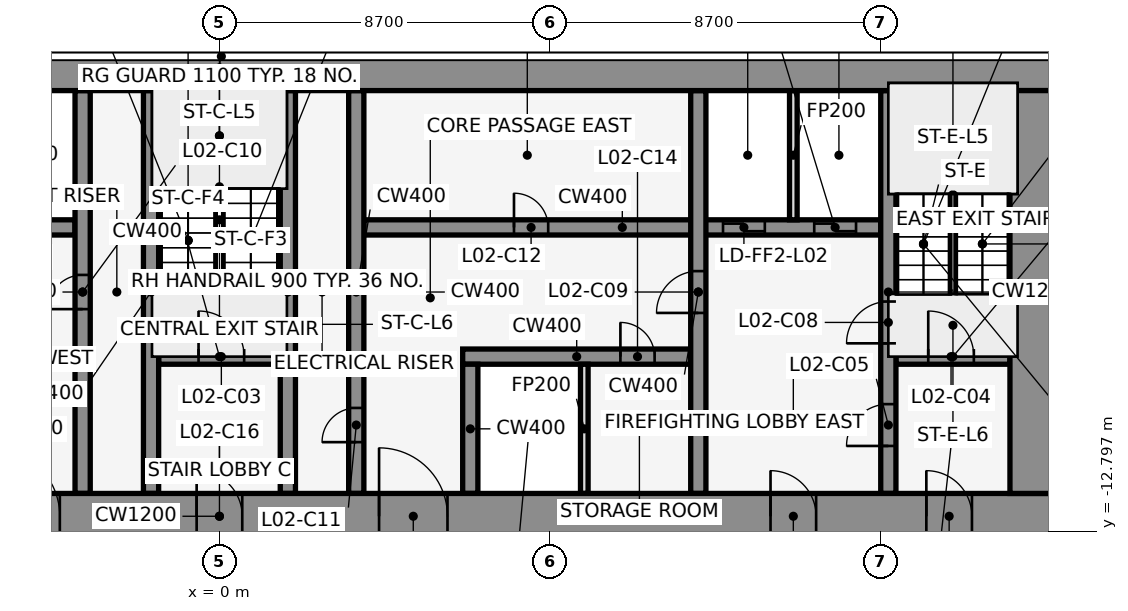
"""IFC4 building model, lengths in metres.
Left out: names, types, materials, properties, quantities, classifications, styles, units other than length and angle.
Written with IfcOpenShell. Run it as: python <this file> out.ifc"""

import sys

from ifc_helpers import new_model, si_unit, direction, frame, frame_2d, origin, place, context, subcontext, project, spatial, rectangle, extrude, element, fill, save


model = new_model("IFC4")
c1 = context("Model", 3, precision=1e-05, world=origin(), true_north=direction((0.0, 1.0)))
c2 = subcontext(c1, "Body", "Model", "MODEL_VIEW")
j1 = project(units=[si_unit("LENGTHUNIT", "METRE"), si_unit("PLANEANGLEUNIT", "RADIAN")], contexts=[c1])
p1 = place(None, origin())
s1 = spatial("IfcSite", under=j1, at=p1, CompositionType="ELEMENT")
p2 = place(p1, origin())
s2 = spatial("IfcBuilding", under=s1, at=p2, CompositionType="ELEMENT")
p3 = place(p2, frame((0.0, 0.0, 14.0)))
s3 = spatial("IfcBuildingStorey", under=s2, at=p3, CompositionType="ELEMENT", Elevation=14.0)
p4 = place(p3, frame((-1.6, -8.2, 0.0), z_axis=(0.0, 0.0, 1.0), x_axis=(1.0, 0.0, 0.0)))
e1 = element("IfcWall", 1, at=p4, inside=s3, PredefinedType="SHEAR", context=c2, shape_type="SweptSolid", body=[
    extrude(rectangle(XDim=3.2, YDim=0.4, at=frame_2d((1.6, 0.0))), origin(), (0.0, 0.0, 1.0), 6.0),
])
p5 = place(p4, frame((1.05, 0.0, 0.0)))
e2 = element("IfcOpeningElement", 2, at=p5, cuts=e1, PredefinedType="OPENING", context=c2, shape_type="SweptSolid", body=[
    extrude(rectangle(XDim=1.2, YDim=2.1, at=frame_2d((0.6, 1.05))), frame((0.0, 0.212, 0.0), z_axis=(0.0, -1.0, 0.0), x_axis=(1.0, 0.0, 0.0)), (0.0, 0.0, 1.0), 0.424),
])
p6 = place(p3, frame((6.4, -8.2, 0.0), z_axis=(0.0, 0.0, 1.0), x_axis=(1.0, 0.0, 0.0)))
e3 = element("IfcWall", 3, at=p6, inside=s3, PredefinedType="SHEAR", context=c2, shape_type="SweptSolid", body=[
    extrude(rectangle(XDim=6.0, YDim=0.4, at=frame_2d((3.0, 0.0))), origin(), (0.0, 0.0, 1.0), 6.0),
])
p7 = place(p6, frame((4.15, 0.0, 0.0)))
e4 = element("IfcOpeningElement", 4, at=p7, cuts=e3, PredefinedType="OPENING", context=c2, shape_type="SweptSolid", body=[
    extrude(rectangle(XDim=0.9, YDim=2.1, at=frame_2d((0.45, 1.05))), frame((0.0, 0.212, 0.0), z_axis=(0.0, -1.0, 0.0), x_axis=(1.0, 0.0, 0.0)), (0.0, 0.0, 1.0), 0.424),
])
p8 = place(p3, frame((17.8, -8.2, 0.0), z_axis=(0.0, 0.0, 1.0), x_axis=(1.0, 0.0, 0.0)))
e5 = element("IfcWall", 5, at=p8, inside=s3, PredefinedType="SHEAR", context=c2, shape_type="SweptSolid", body=[
    extrude(rectangle(XDim=3.0, YDim=0.4, at=frame_2d((1.5, 0.0))), origin(), (0.0, 0.0, 1.0), 6.0),
])
p9 = place(p8, frame((0.85, 0.0, 0.0)))
e6 = element("IfcOpeningElement", 6, at=p9, cuts=e5, PredefinedType="OPENING", context=c2, shape_type="SweptSolid", body=[
    extrude(rectangle(XDim=1.2, YDim=2.1, at=frame_2d((0.6, 1.05))), frame((0.0, 0.212, 0.0), z_axis=(0.0, -1.0, 0.0), x_axis=(1.0, 0.0, 0.0)), (0.0, 0.0, 1.0), 0.424),
])
p10 = place(p3, frame((-17.4, -4.8, 0.0), z_axis=(0.0, 0.0, 1.0), x_axis=(1.0, 0.0, 0.0)))
e7 = element("IfcWall", 7, at=p10, inside=s3, PredefinedType="SHEAR", context=c2, shape_type="SweptSolid", body=[
    extrude(rectangle(XDim=13.6, YDim=0.4, at=frame_2d((6.8, 0.0))), origin(), (0.0, 0.0, 1.0), 6.0),
])
p11 = place(p10, frame((0.65, 0.0, 0.0)))
e8 = element("IfcOpeningElement", 8, at=p11, cuts=e7, PredefinedType="OPENING", context=c2, shape_type="SweptSolid", body=[
    extrude(rectangle(XDim=1.1, YDim=2.1, at=frame_2d((0.55, 1.05))), frame((0.0, 0.212, 0.0), z_axis=(0.0, -1.0, 0.0), x_axis=(1.0, 0.0, 0.0)), (0.0, 0.0, 1.0), 0.424),
])
p12 = place(p10, frame((2.95, 0.0, 0.0)))
e9 = element("IfcOpeningElement", 9, at=p12, cuts=e7, PredefinedType="OPENING", context=c2, shape_type="SweptSolid", body=[
    extrude(rectangle(XDim=1.1, YDim=2.1, at=frame_2d((0.55, 1.05))), frame((0.0, 0.212, 0.0), z_axis=(0.0, -1.0, 0.0), x_axis=(1.0, 0.0, 0.0)), (0.0, 0.0, 1.0), 0.424),
])
p13 = place(p10, frame((5.65, 0.0, 0.0)))
e10 = element("IfcOpeningElement", 10, at=p13, cuts=e7, PredefinedType="OPENING", context=c2, shape_type="SweptSolid", body=[
    extrude(rectangle(XDim=1.2, YDim=2.1, at=frame_2d((0.6, 1.05))), frame((0.0, 0.212, 0.0), z_axis=(0.0, -1.0, 0.0), x_axis=(1.0, 0.0, 0.0)), (0.0, 0.0, 1.0), 0.424),
])
p14 = place(p10, frame((8.65, 0.0, 0.0)))
e11 = element("IfcOpeningElement", 11, at=p14, cuts=e7, PredefinedType="OPENING", context=c2, shape_type="SweptSolid", body=[
    extrude(rectangle(XDim=1.2, YDim=2.1, at=frame_2d((0.6, 1.05))), frame((0.0, 0.212, 0.0), z_axis=(0.0, -1.0, 0.0), x_axis=(1.0, 0.0, 0.0)), (0.0, 0.0, 1.0), 0.424),
])
p15 = place(p10, frame((11.65, 0.0, 0.0)))
e12 = element("IfcOpeningElement", 12, at=p15, cuts=e7, PredefinedType="OPENING", context=c2, shape_type="SweptSolid", body=[
    extrude(rectangle(XDim=1.2, YDim=2.1, at=frame_2d((0.6, 1.05))), frame((0.0, 0.212, 0.0), z_axis=(0.0, -1.0, 0.0), x_axis=(1.0, 0.0, 0.0)), (0.0, 0.0, 1.0), 0.424),
])
p16 = place(p3, frame((3.8, -4.8, 0.0), z_axis=(0.0, 0.0, 1.0), x_axis=(1.0, 0.0, 0.0)))
e13 = element("IfcWall", 13, at=p16, inside=s3, PredefinedType="SHEAR", context=c2, shape_type="SweptSolid", body=[
    extrude(rectangle(XDim=13.6, YDim=0.4, at=frame_2d((6.8, 0.0))), origin(), (0.0, 0.0, 1.0), 6.0),
])
p17 = place(p16, frame((9.45, 0.0, 0.0)))
e14 = element("IfcOpeningElement", 14, at=p17, cuts=e13, PredefinedType="OPENING", context=c2, shape_type="SweptSolid", body=[
    extrude(rectangle(XDim=1.1, YDim=2.1, at=frame_2d((0.55, 1.05))), frame((0.0, 0.212, 0.0), z_axis=(0.0, -1.0, 0.0), x_axis=(1.0, 0.0, 0.0)), (0.0, 0.0, 1.0), 0.424),
])
p18 = place(p16, frame((11.85, 0.0, 0.0)))
e15 = element("IfcOpeningElement", 15, at=p18, cuts=e13, PredefinedType="OPENING", context=c2, shape_type="SweptSolid", body=[
    extrude(rectangle(XDim=1.1, YDim=2.1, at=frame_2d((0.55, 1.05))), frame((0.0, 0.212, 0.0), z_axis=(0.0, -1.0, 0.0), x_axis=(1.0, 0.0, 0.0)), (0.0, 0.0, 1.0), 0.424),
])
p19 = place(p16, frame((3.95, 0.0, 0.0)))
e16 = element("IfcOpeningElement", 16, at=p19, cuts=e13, PredefinedType="OPENING", context=c2, shape_type="SweptSolid", body=[
    extrude(rectangle(XDim=0.9, YDim=2.1, at=frame_2d((0.45, 1.05))), frame((0.0, 0.212, 0.0), z_axis=(0.0, -1.0, 0.0), x_axis=(1.0, 0.0, 0.0)), (0.0, 0.0, 1.0), 0.424),
])
p20 = place(p3, frame((-3.6, -11.8, 0.0), z_axis=(0.0, 0.0, 1.0), x_axis=(0.0, 1.0, 0.0)))
e17 = element("IfcWall", 17, at=p20, inside=s3, PredefinedType="SHEAR", context=c2, shape_type="SweptSolid", body=[
    extrude(rectangle(XDim=10.6, YDim=0.4, at=frame_2d((5.3, 0.0))), origin(), (0.0, 0.0, 1.0), 6.0),
])
p21 = place(p20, frame((4.85, 0.0, 0.0)))
e18 = element("IfcOpeningElement", 18, at=p21, cuts=e17, PredefinedType="OPENING", context=c2, shape_type="SweptSolid", body=[
    extrude(rectangle(XDim=0.9, YDim=2.1, at=frame_2d((0.45, 1.05))), frame((0.0, 0.212, 0.0), z_axis=(0.0, -1.0, 0.0), x_axis=(1.0, 0.0, 0.0)), (0.0, 0.0, 1.0), 0.424),
])
for number, where, z_axis, x_axis in (
    (19, (-1.8, -11.8, 0.0), (0.0, 0.0, 1.0), (0.0, 1.0, 0.0)),
    (20, (1.8, -11.8, 0.0), (0.0, 0.0, 1.0), (0.0, 1.0, 0.0)),
):
    element("IfcWall", number, at=place(p3, frame(where, z_axis=z_axis, x_axis=x_axis)), inside=s3, PredefinedType="SHEAR", context=c2, shape_type="SweptSolid", body=[
        extrude(rectangle(XDim=10.6, YDim=0.4, at=frame_2d((5.3, 0.0))), origin(), (0.0, 0.0, 1.0), 6.0),
    ])
p22 = place(p3, frame((3.6, -11.8, 0.0), z_axis=(0.0, 0.0, 1.0), x_axis=(0.0, 1.0, 0.0)))
e21 = element("IfcWall", 21, at=p22, inside=s3, PredefinedType="SHEAR", context=c2, shape_type="SweptSolid", body=[
    extrude(rectangle(XDim=10.6, YDim=0.4, at=frame_2d((5.3, 0.0))), origin(), (0.0, 0.0, 1.0), 6.0),
])
p23 = place(p22, frame((1.35, 0.0, 0.0)))
e22 = element("IfcOpeningElement", 22, at=p23, cuts=e21, PredefinedType="OPENING", context=c2, shape_type="SweptSolid", body=[
    extrude(rectangle(XDim=0.9, YDim=2.1, at=frame_2d((0.45, 1.05))), frame((0.0, 0.212, 0.0), z_axis=(0.0, -1.0, 0.0), x_axis=(1.0, 0.0, 0.0)), (0.0, 0.0, 1.0), 0.424),
])
p24 = place(p3, frame((6.6, -11.8, 0.0), z_axis=(0.0, 0.0, 1.0), x_axis=(0.0, 1.0, 0.0)))
e23 = element("IfcWall", 23, at=p24, inside=s3, PredefinedType="SHEAR", context=c2, shape_type="SweptSolid", body=[
    extrude(rectangle(XDim=3.4, YDim=0.4, at=frame_2d((1.7, 0.0))), origin(), (0.0, 0.0, 1.0), 6.0),
])
p25 = place(p3, frame((9.6, -11.8, 0.0), z_axis=(0.0, 0.0, 1.0), x_axis=(0.0, 1.0, 0.0)))
e24 = element("IfcWall", 24, at=p25, inside=s3, PredefinedType="PARTITIONING", context=c2, shape_type="SweptSolid", body=[
    extrude(rectangle(XDim=3.4, YDim=0.2, at=frame_2d((1.7, 0.0))), origin(), (0.0, 0.0, 1.0), 5.7),
])
p26 = place(p3, frame((12.6, -11.8, 0.0), z_axis=(0.0, 0.0, 1.0), x_axis=(0.0, 1.0, 0.0)))
e25 = element("IfcWall", 25, at=p26, inside=s3, PredefinedType="SHEAR", context=c2, shape_type="SweptSolid", body=[
    extrude(rectangle(XDim=10.6, YDim=0.4, at=frame_2d((5.3, 0.0))), origin(), (0.0, 0.0, 1.0), 6.0),
])
p27 = place(p26, frame((4.75, 0.0, 0.0)))
e26 = element("IfcOpeningElement", 26, at=p27, cuts=e25, PredefinedType="OPENING", context=c2, shape_type="SweptSolid", body=[
    extrude(rectangle(XDim=1.1, YDim=2.1, at=frame_2d((0.55, 1.05))), frame((0.0, 0.212, 0.0), z_axis=(0.0, -1.0, 0.0), x_axis=(1.0, 0.0, 0.0)), (0.0, 0.0, 1.0), 0.424),
])
p28 = place(p3, frame((15.1, -4.6, 0.0), z_axis=(0.0, 0.0, 1.0), x_axis=(0.0, 1.0, 0.0)))
e27 = element("IfcWall", 27, at=p28, inside=s3, PredefinedType="PARTITIONING", context=c2, shape_type="SweptSolid", body=[
    extrude(rectangle(XDim=3.4, YDim=0.2, at=frame_2d((1.7, 0.0))), origin(), (0.0, 0.0, 1.0), 5.7),
])
p29 = place(p3, frame((17.6, -11.8, 0.0), z_axis=(0.0, 0.0, 1.0), x_axis=(0.0, 1.0, 0.0)))
e28 = element("IfcWall", 28, at=p29, inside=s3, PredefinedType="SHEAR", context=c2, shape_type="SweptSolid", body=[
    extrude(rectangle(XDim=10.6, YDim=0.4, at=frame_2d((5.3, 0.0))), origin(), (0.0, 0.0, 1.0), 6.0),
])
p30 = place(p29, frame((1.25, 0.0, 0.0)))
e29 = element("IfcOpeningElement", 29, at=p30, cuts=e28, PredefinedType="OPENING", context=c2, shape_type="SweptSolid", body=[
    extrude(rectangle(XDim=1.1, YDim=2.1, at=frame_2d((0.55, 1.05))), frame((0.0, 0.212, 0.0), z_axis=(0.0, -1.0, 0.0), x_axis=(1.0, 0.0, 0.0)), (0.0, 0.0, 1.0), 0.424),
])
p31 = place(p29, frame((3.95, 0.0, 0.0)))
e30 = element("IfcOpeningElement", 30, at=p31, cuts=e28, PredefinedType="OPENING", context=c2, shape_type="SweptSolid", body=[
    extrude(rectangle(XDim=1.1, YDim=2.1, at=frame_2d((0.55, 1.05))), frame((0.0, 0.212, 0.0), z_axis=(0.0, -1.0, 0.0), x_axis=(1.0, 0.0, 0.0)), (0.0, 0.0, 1.0), 0.424),
])
p32 = place(p3, frame((-22.0, -0.6, 0.0), z_axis=(0.0, 0.0, 1.0), x_axis=(1.0, 0.0, 0.0)))
e31 = element("IfcWall", 31, at=p32, inside=s3, PredefinedType="SHEAR", context=c2, shape_type="SweptSolid", body=[
    extrude(rectangle(XDim=44.0, YDim=1.2, at=frame_2d((22.0, 0.0))), origin(), (0.0, 0.0, 1.0), 6.0),
])
p33 = place(p3, frame((-22.0, -12.4, 0.0), z_axis=(0.0, 0.0, 1.0), x_axis=(1.0, 0.0, 0.0)))
e32 = element("IfcWall", 32, at=p33, inside=s3, PredefinedType="SHEAR", context=c2, shape_type="SweptSolid", body=[
    extrude(rectangle(XDim=44.0, YDim=1.2, at=frame_2d((22.0, 0.0))), origin(), (0.0, 0.0, 1.0), 6.0),
])
p34 = place(p33, frame((2.2, 0.0, 0.0)))
e33 = element("IfcOpeningElement", 33, at=p34, cuts=e32, PredefinedType="OPENING", context=c2, shape_type="SweptSolid", body=[
    extrude(rectangle(XDim=1.2, YDim=2.1, at=frame_2d((0.6, 1.05))), frame((0.0, 0.612, 0.0), z_axis=(0.0, -1.0, 0.0), x_axis=(1.0, 0.0, 0.0)), (0.0, 0.0, 1.0), 1.224),
])
p35 = place(p33, frame((21.4, 0.0, 0.0)))
e34 = element("IfcOpeningElement", 34, at=p35, cuts=e32, PredefinedType="OPENING", context=c2, shape_type="SweptSolid", body=[
    extrude(rectangle(XDim=1.2, YDim=2.1, at=frame_2d((0.6, 1.05))), frame((0.0, 0.612, 0.0), z_axis=(0.0, -1.0, 0.0), x_axis=(1.0, 0.0, 0.0)), (0.0, 0.0, 1.0), 1.224),
])
p36 = place(p33, frame((40.6, 0.0, 0.0)))
e35 = element("IfcOpeningElement", 35, at=p36, cuts=e32, PredefinedType="OPENING", context=c2, shape_type="SweptSolid", body=[
    extrude(rectangle(XDim=1.2, YDim=2.1, at=frame_2d((0.6, 1.05))), frame((0.0, 0.612, 0.0), z_axis=(0.0, -1.0, 0.0), x_axis=(1.0, 0.0, 0.0)), (0.0, 0.0, 1.0), 1.224),
])
p37 = place(p33, frame((16.0, 0.0, 0.0)))
e36 = element("IfcOpeningElement", 36, at=p37, cuts=e32, PredefinedType="OPENING", context=c2, shape_type="SweptSolid", body=[
    extrude(rectangle(XDim=1.8, YDim=2.1, at=frame_2d((0.9, 1.05))), frame((0.0, 0.612, 0.0), z_axis=(0.0, -1.0, 0.0), x_axis=(1.0, 0.0, 0.0)), (0.0, 0.0, 1.0), 1.224),
])
p38 = place(p33, frame((6.3, 0.0, 0.0)))
e37 = element("IfcOpeningElement", 37, at=p38, cuts=e32, PredefinedType="OPENING", context=c2, shape_type="SweptSolid", body=[
    extrude(rectangle(XDim=1.2, YDim=2.1, at=frame_2d((0.6, 1.05))), frame((0.0, 0.612, 0.0), z_axis=(0.0, -1.0, 0.0), x_axis=(1.0, 0.0, 0.0)), (0.0, 0.0, 1.0), 1.224),
])
p39 = place(p33, frame((26.2, 0.0, 0.0)))
e38 = element("IfcOpeningElement", 38, at=p39, cuts=e32, PredefinedType="OPENING", context=c2, shape_type="SweptSolid", body=[
    extrude(rectangle(XDim=1.8, YDim=2.1, at=frame_2d((0.9, 1.05))), frame((0.0, 0.612, 0.0), z_axis=(0.0, -1.0, 0.0), x_axis=(1.0, 0.0, 0.0)), (0.0, 0.0, 1.0), 1.224),
])
p40 = place(p33, frame((36.5, 0.0, 0.0)))
e39 = element("IfcOpeningElement", 39, at=p40, cuts=e32, PredefinedType="OPENING", context=c2, shape_type="SweptSolid", body=[
    extrude(rectangle(XDim=1.2, YDim=2.1, at=frame_2d((0.6, 1.05))), frame((0.0, 0.612, 0.0), z_axis=(0.0, -1.0, 0.0), x_axis=(1.0, 0.0, 0.0)), (0.0, 0.0, 1.0), 1.224),
])
p41 = place(p3, frame((21.4, -11.8, 0.0), z_axis=(0.0, 0.0, 1.0), x_axis=(0.0, 1.0, 0.0)))
e40 = element("IfcWall", 40, at=p41, inside=s3, PredefinedType="SHEAR", context=c2, shape_type="SweptSolid", body=[
    extrude(rectangle(XDim=10.6, YDim=1.2, at=frame_2d((5.3, 0.0))), origin(), (0.0, 0.0, 1.0), 6.0),
])
p42 = place(p5, origin())
e41 = element("IfcDoor", 41, at=p42, inside=s3, OperationType="SINGLE_SWING_LEFT", PredefinedType="DOOR", context=c2, shape_type="SweptSolid", body=[
    extrude(rectangle(XDim=1.2, YDim=2.1, at=frame_2d((0.6, 1.05))), frame((0.0, 0.025, 0.0), z_axis=(0.0, -1.0, 0.0), x_axis=(1.0, 0.0, 0.0)), (0.0, 0.0, 1.0), 0.05),
])
fill(e2, e41)
p43 = place(p9, origin())
e42 = element("IfcDoor", 42, at=p43, inside=s3, OperationType="SINGLE_SWING_RIGHT", PredefinedType="DOOR", context=c2, shape_type="SweptSolid", body=[
    extrude(rectangle(XDim=1.2, YDim=2.1, at=frame_2d((0.6, 1.05))), frame((0.0, 0.025, 0.0), z_axis=(0.0, -1.0, 0.0), x_axis=(1.0, 0.0, 0.0)), (0.0, 0.0, 1.0), 0.05),
])
fill(e6, e42)
p44 = place(p30, origin())
e43 = element("IfcDoor", 43, at=p44, inside=s3, OperationType="SINGLE_SWING_LEFT", PredefinedType="DOOR", context=c2, shape_type="SweptSolid", body=[
    extrude(rectangle(XDim=1.1, YDim=2.1, at=frame_2d((0.55, 1.05))), frame((0.0, 0.025, 0.0), z_axis=(0.0, -1.0, 0.0), x_axis=(1.0, 0.0, 0.0)), (0.0, 0.0, 1.0), 0.05),
])
fill(e29, e43)
p45 = place(p17, origin())
e44 = element("IfcDoor", 44, at=p45, inside=s3, OperationType="DOUBLE_DOOR_SLIDING", PredefinedType="DOOR", context=c2, shape_type="SweptSolid", body=[
    extrude(rectangle(XDim=1.1, YDim=2.1, at=frame_2d((0.55, 1.05))), frame((0.0, 0.025, 0.0), z_axis=(0.0, -1.0, 0.0), x_axis=(1.0, 0.0, 0.0)), (0.0, 0.0, 1.0), 0.05),
])
fill(e14, e44)
p46 = place(p18, origin())
e45 = element("IfcDoor", 45, at=p46, inside=s3, OperationType="DOUBLE_DOOR_SLIDING", PredefinedType="DOOR", context=c2, shape_type="SweptSolid", body=[
    extrude(rectangle(XDim=1.1, YDim=2.1, at=frame_2d((0.55, 1.05))), frame((0.0, 0.025, 0.0), z_axis=(0.0, -1.0, 0.0), x_axis=(1.0, 0.0, 0.0)), (0.0, 0.0, 1.0), 0.05),
])
fill(e15, e45)
p47 = place(p31, origin())
e46 = element("IfcDoor", 46, at=p47, inside=s3, OperationType="SINGLE_SWING_RIGHT", PredefinedType="DOOR", context=c2, shape_type="SweptSolid", body=[
    extrude(rectangle(XDim=1.1, YDim=2.1, at=frame_2d((0.55, 1.05))), frame((0.0, 0.025, 0.0), z_axis=(0.0, -1.0, 0.0), x_axis=(1.0, 0.0, 0.0)), (0.0, 0.0, 1.0), 0.05),
])
fill(e30, e46)
p48 = place(p27, frame((1.1, 0.0, 0.0), z_axis=(0.0, 0.0, 1.0), x_axis=(-1.0, 0.0, 0.0)))
e47 = element("IfcDoor", 47, at=p48, inside=s3, OperationType="SINGLE_SWING_RIGHT", PredefinedType="DOOR", context=c2, shape_type="SweptSolid", body=[
    extrude(rectangle(XDim=1.1, YDim=2.1, at=frame_2d((0.55, 1.05))), frame((0.0, 0.025, 0.0), z_axis=(0.0, -1.0, 0.0), x_axis=(1.0, 0.0, 0.0)), (0.0, 0.0, 1.0), 0.05),
])
fill(e26, e47)
p49 = place(p21, frame((0.9, 0.0, 0.0), z_axis=(0.0, 0.0, 1.0), x_axis=(-1.0, 0.0, 0.0)))
e48 = element("IfcDoor", 48, at=p49, inside=s3, OperationType="SINGLE_SWING_LEFT", PredefinedType="DOOR", context=c2, shape_type="SweptSolid", body=[
    extrude(rectangle(XDim=0.9, YDim=2.1, at=frame_2d((0.45, 1.05))), frame((0.0, 0.025, 0.0), z_axis=(0.0, -1.0, 0.0), x_axis=(1.0, 0.0, 0.0)), (0.0, 0.0, 1.0), 0.05),
])
fill(e18, e48)
p50 = place(p23, origin())
e49 = element("IfcDoor", 49, at=p50, inside=s3, OperationType="SINGLE_SWING_LEFT", PredefinedType="DOOR", context=c2, shape_type="SweptSolid", body=[
    extrude(rectangle(XDim=0.9, YDim=2.1, at=frame_2d((0.45, 1.05))), frame((0.0, 0.025, 0.0), z_axis=(0.0, -1.0, 0.0), x_axis=(1.0, 0.0, 0.0)), (0.0, 0.0, 1.0), 0.05),
])
fill(e22, e49)
p51 = place(p19, origin())
e50 = element("IfcDoor", 50, at=p51, inside=s3, OperationType="SINGLE_SWING_RIGHT", PredefinedType="DOOR", context=c2, shape_type="SweptSolid", body=[
    extrude(rectangle(XDim=0.9, YDim=2.1, at=frame_2d((0.45, 1.05))), frame((0.0, 0.025, 0.0), z_axis=(0.0, -1.0, 0.0), x_axis=(1.0, 0.0, 0.0)), (0.0, 0.0, 1.0), 0.05),
])
fill(e16, e50)
p52 = place(p7, frame((0.9, 0.0, 0.0), z_axis=(0.0, 0.0, 1.0), x_axis=(-1.0, 0.0, 0.0)))
e51 = element("IfcDoor", 51, at=p52, inside=s3, OperationType="SINGLE_SWING_LEFT", PredefinedType="DOOR", context=c2, shape_type="SweptSolid", body=[
    extrude(rectangle(XDim=0.9, YDim=2.1, at=frame_2d((0.45, 1.05))), frame((0.0, 0.025, 0.0), z_axis=(0.0, -1.0, 0.0), x_axis=(1.0, 0.0, 0.0)), (0.0, 0.0, 1.0), 0.05),
])
fill(e4, e51)
p53 = place(p35, frame((1.2, 0.0, 0.0), z_axis=(0.0, 0.0, 1.0), x_axis=(-1.0, 0.0, 0.0)))
e52 = element("IfcDoor", 52, at=p53, inside=s3, OperationType="SINGLE_SWING_RIGHT", PredefinedType="DOOR", context=c2, shape_type="SweptSolid", body=[
    extrude(rectangle(XDim=1.2, YDim=2.1, at=frame_2d((0.6, 1.05))), frame((0.0, 0.025, 0.0), z_axis=(0.0, -1.0, 0.0), x_axis=(1.0, 0.0, 0.0)), (0.0, 0.0, 1.0), 0.05),
])
fill(e34, e52)
p54 = place(p36, frame((1.2, 0.0, 0.0), z_axis=(0.0, 0.0, 1.0), x_axis=(-1.0, 0.0, 0.0)))
e53 = element("IfcDoor", 53, at=p54, inside=s3, OperationType="SINGLE_SWING_RIGHT", PredefinedType="DOOR", context=c2, shape_type="SweptSolid", body=[
    extrude(rectangle(XDim=1.2, YDim=2.1, at=frame_2d((0.6, 1.05))), frame((0.0, 0.025, 0.0), z_axis=(0.0, -1.0, 0.0), x_axis=(1.0, 0.0, 0.0)), (0.0, 0.0, 1.0), 0.05),
])
fill(e35, e53)
p55 = place(p37, origin())
e54 = element("IfcDoor", 54, at=p55, inside=s3, OperationType="SINGLE_SWING_LEFT", PredefinedType="DOOR", context=c2, shape_type="SweptSolid", body=[
    extrude(rectangle(XDim=1.8, YDim=2.1, at=frame_2d((0.9, 1.05))), frame((0.0, 0.025, 0.0), z_axis=(0.0, -1.0, 0.0), x_axis=(1.0, 0.0, 0.0)), (0.0, 0.0, 1.0), 0.05),
])
fill(e36, e54)
p56 = place(p39, origin())
e55 = element("IfcDoor", 55, at=p56, inside=s3, OperationType="SINGLE_SWING_LEFT", PredefinedType="DOOR", context=c2, shape_type="SweptSolid", body=[
    extrude(rectangle(XDim=1.8, YDim=2.1, at=frame_2d((0.9, 1.05))), frame((0.0, 0.025, 0.0), z_axis=(0.0, -1.0, 0.0), x_axis=(1.0, 0.0, 0.0)), (0.0, 0.0, 1.0), 0.05),
])
fill(e38, e55)
p57 = place(p40, frame((1.2, 0.0, 0.0), z_axis=(0.0, 0.0, 1.0), x_axis=(-1.0, 0.0, 0.0)))
e56 = element("IfcDoor", 56, at=p57, inside=s3, OperationType="SINGLE_SWING_RIGHT", PredefinedType="DOOR", context=c2, shape_type="SweptSolid", body=[
    extrude(rectangle(XDim=1.2, YDim=2.1, at=frame_2d((0.6, 1.05))), frame((0.0, 0.025, 0.0), z_axis=(0.0, -1.0, 0.0), x_axis=(1.0, 0.0, 0.0)), (0.0, 0.0, 1.0), 0.05),
])
fill(e39, e56)
save(model, sys.argv[1])
